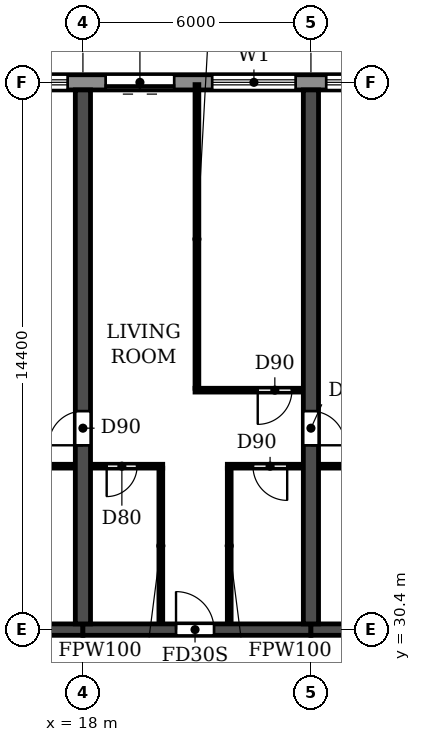
"""IFC4 building model, lengths in metres.
Left out: names, types, materials, properties, quantities, classifications, styles, units other than length and angle.
Written with IfcOpenShell. Run it as: python <this file> out.ifc"""

import sys

from ifc_helpers import new_model, si_unit, direction, frame, frame_2d, origin, place, context, subcontext, project, spatial, rectangle, extrude, element, fill, save


model = new_model("IFC4")
c1 = context("Model", 3, precision=1e-05, world=origin(), true_north=direction((0.0, 1.0)))
c2 = subcontext(c1, "Body", "Model", "MODEL_VIEW")
j1 = project(units=[si_unit("LENGTHUNIT", "METRE"), si_unit("PLANEANGLEUNIT", "RADIAN")], contexts=[c1])
p1 = place(None, origin())
s1 = spatial("IfcSite", under=j1, at=p1, CompositionType="ELEMENT")
p2 = place(p1, origin())
s2 = spatial("IfcBuilding", under=s1, at=p2, CompositionType="ELEMENT")
p3 = place(p2, frame((0.0, 0.0, 23.4)))
s3 = spatial("IfcBuildingStorey", under=s2, at=p3, CompositionType="ELEMENT", Elevation=23.4)
p4 = place(p3, frame((18.0, 30.55, 0.0), z_axis=(0.0, 0.0, 1.0), x_axis=(0.0, 1.0, 0.0)))
e1 = element("IfcWall", 1, at=p4, inside=s3, PredefinedType="SHEAR", context=c2, shape_type="SweptSolid", body=[
    extrude(rectangle(XDim=14.05, YDim=0.4, at=frame_2d((7.025, 0.0))), origin(), (0.0, 0.0, 1.0), 3.05),
])
p5 = place(p4, frame((4.7, 0.0, 0.0)))
e2 = element("IfcOpeningElement", 2, at=p5, cuts=e1, PredefinedType="OPENING", context=c2, shape_type="SweptSolid", body=[
    extrude(rectangle(XDim=0.9, YDim=2.1, at=frame_2d((0.45, 1.05))), frame((0.0, 0.21, 0.0), z_axis=(0.0, -1.0, 0.0), x_axis=(1.0, 0.0, 0.0)), (0.0, 0.0, 1.0), 0.42),
])
p6 = place(p3, frame((24.0, 30.55, 0.0), z_axis=(0.0, 0.0, 1.0), x_axis=(0.0, 1.0, 0.0)))
e3 = element("IfcWall", 3, at=p6, inside=s3, PredefinedType="SHEAR", context=c2, shape_type="SweptSolid", body=[
    extrude(rectangle(XDim=14.05, YDim=0.4, at=frame_2d((7.025, 0.0))), origin(), (0.0, 0.0, 1.0), 3.05),
])
p7 = place(p6, frame((4.7, 0.0, 0.0)))
e4 = element("IfcOpeningElement", 4, at=p7, cuts=e3, PredefinedType="OPENING", context=c2, shape_type="SweptSolid", body=[
    extrude(rectangle(XDim=0.9, YDim=2.1, at=frame_2d((0.45, 1.05))), frame((0.0, 0.21, 0.0), z_axis=(0.0, -1.0, 0.0), x_axis=(1.0, 0.0, 0.0)), (0.0, 0.0, 1.0), 0.42),
])
p8 = place(p3, frame((12.0, 30.4, 0.0), z_axis=(0.0, 0.0, 1.0), x_axis=(1.0, 0.0, 0.0)))
e5 = element("IfcWall", 5, at=p8, inside=s3, PredefinedType="SHEAR", context=c2, shape_type="SweptSolid", body=[
    extrude(rectangle(XDim=6.0, YDim=0.3, at=frame_2d((3.0, 0.0))), origin(), (0.0, 0.0, 1.0), 2.45),
])
p9 = place(p3, frame((18.0, 30.4, 0.0), z_axis=(0.0, 0.0, 1.0), x_axis=(1.0, 0.0, 0.0)))
e6 = element("IfcWall", 6, at=p9, inside=s3, PredefinedType="SHEAR", context=c2, shape_type="SweptSolid", body=[
    extrude(rectangle(XDim=6.0, YDim=0.3, at=frame_2d((3.0, 0.0))), origin(), (0.0, 0.0, 1.0), 2.45),
])
p10 = place(p9, frame((2.45, 0.0, 0.0)))
e7 = element("IfcOpeningElement", 7, at=p10, cuts=e6, PredefinedType="OPENING", context=c2, shape_type="SweptSolid", body=[
    extrude(rectangle(XDim=1.0, YDim=2.1, at=frame_2d((0.5, 1.05))), frame((0.0, 0.16, 0.0), z_axis=(0.0, -1.0, 0.0), x_axis=(1.0, 0.0, 0.0)), (0.0, 0.0, 1.0), 0.32),
])
p11 = place(p3, frame((24.0, 30.4, 0.0), z_axis=(0.0, 0.0, 1.0), x_axis=(1.0, 0.0, 0.0)))
e8 = element("IfcWall", 8, at=p11, inside=s3, PredefinedType="SHEAR", context=c2, shape_type="SweptSolid", body=[
    extrude(rectangle(XDim=6.0, YDim=0.3, at=frame_2d((3.0, 0.0))), origin(), (0.0, 0.0, 1.0), 2.45),
])
p12 = place(p3, frame((97.317, 44.8, 0.0), z_axis=(0.0, 0.0, 1.0), x_axis=(-1.0, 0.0, 0.0)))
e9 = element("IfcWall", 9, at=p12, inside=s3, PredefinedType="STANDARD", context=c2, shape_type="SweptSolid", body=[
    extrude(rectangle(XDim=92.634, YDim=0.4, at=frame_2d((46.317, 0.0))), origin(), (0.0, 0.0, 1.0), 3.05),
])
p13 = place(p12, frame((88.717, 0.0, 0.9)))
e10 = element("IfcOpeningElement", 10, at=p13, cuts=e9, PredefinedType="OPENING", context=c2, shape_type="SweptSolid", body=[
    extrude(rectangle(XDim=2.2, YDim=1.5, at=frame_2d((1.1, 0.75))), frame((0.0, 0.21, 0.0), z_axis=(0.0, -1.0, 0.0), x_axis=(1.0, 0.0, 0.0)), (0.0, 0.0, 1.0), 0.42),
])
p14 = place(p12, frame((85.917, 0.0, 0.0)))
e11 = element("IfcOpeningElement", 11, at=p14, cuts=e9, PredefinedType="OPENING", context=c2, shape_type="SweptSolid", body=[
    extrude(rectangle(XDim=1.8, YDim=2.4, at=frame_2d((0.9, 1.2))), frame((0.0, 0.21, 0.0), z_axis=(0.0, -1.0, 0.0), x_axis=(1.0, 0.0, 0.0)), (0.0, 0.0, 1.0), 0.42),
])
p15 = place(p12, frame((82.717, 0.0, 0.9)))
e12 = element("IfcOpeningElement", 12, at=p15, cuts=e9, PredefinedType="OPENING", context=c2, shape_type="SweptSolid", body=[
    extrude(rectangle(XDim=2.2, YDim=1.5, at=frame_2d((1.1, 0.75))), frame((0.0, 0.21, 0.0), z_axis=(0.0, -1.0, 0.0), x_axis=(1.0, 0.0, 0.0)), (0.0, 0.0, 1.0), 0.42),
])
p16 = place(p12, frame((79.717, 0.0, 0.9)))
e13 = element("IfcOpeningElement", 13, at=p16, cuts=e9, PredefinedType="OPENING", context=c2, shape_type="SweptSolid", body=[
    extrude(rectangle(XDim=2.2, YDim=1.5, at=frame_2d((1.1, 0.75))), frame((0.0, 0.21, 0.0), z_axis=(0.0, -1.0, 0.0), x_axis=(1.0, 0.0, 0.0)), (0.0, 0.0, 1.0), 0.42),
])
p17 = place(p12, frame((76.917, 0.0, 0.0)))
e14 = element("IfcOpeningElement", 14, at=p17, cuts=e9, PredefinedType="OPENING", context=c2, shape_type="SweptSolid", body=[
    extrude(rectangle(XDim=1.8, YDim=2.4, at=frame_2d((0.9, 1.2))), frame((0.0, 0.21, 0.0), z_axis=(0.0, -1.0, 0.0), x_axis=(1.0, 0.0, 0.0)), (0.0, 0.0, 1.0), 0.42),
])
p18 = place(p12, frame((73.717, 0.0, 0.9)))
e15 = element("IfcOpeningElement", 15, at=p18, cuts=e9, PredefinedType="OPENING", context=c2, shape_type="SweptSolid", body=[
    extrude(rectangle(XDim=2.2, YDim=1.5, at=frame_2d((1.1, 0.75))), frame((0.0, 0.21, 0.0), z_axis=(0.0, -1.0, 0.0), x_axis=(1.0, 0.0, 0.0)), (0.0, 0.0, 1.0), 0.42),
])
p19 = place(p12, frame((70.717, 0.0, 0.9)))
e16 = element("IfcOpeningElement", 16, at=p19, cuts=e9, PredefinedType="OPENING", context=c2, shape_type="SweptSolid", body=[
    extrude(rectangle(XDim=2.2, YDim=1.5, at=frame_2d((1.1, 0.75))), frame((0.0, 0.21, 0.0), z_axis=(0.0, -1.0, 0.0), x_axis=(1.0, 0.0, 0.0)), (0.0, 0.0, 1.0), 0.42),
])
p20 = place(p12, frame((67.717, 0.0, 0.9)))
e17 = element("IfcOpeningElement", 17, at=p20, cuts=e9, PredefinedType="OPENING", context=c2, shape_type="SweptSolid", body=[
    extrude(rectangle(XDim=2.2, YDim=1.5, at=frame_2d((1.1, 0.75))), frame((0.0, 0.21, 0.0), z_axis=(0.0, -1.0, 0.0), x_axis=(1.0, 0.0, 0.0)), (0.0, 0.0, 1.0), 0.42),
])
p21 = place(p12, frame((64.917, 0.0, 0.0)))
e18 = element("IfcOpeningElement", 18, at=p21, cuts=e9, PredefinedType="OPENING", context=c2, shape_type="SweptSolid", body=[
    extrude(rectangle(XDim=1.8, YDim=2.4, at=frame_2d((0.9, 1.2))), frame((0.0, 0.21, 0.0), z_axis=(0.0, -1.0, 0.0), x_axis=(1.0, 0.0, 0.0)), (0.0, 0.0, 1.0), 0.42),
])
p22 = place(p12, frame((61.717, 0.0, 0.9)))
e19 = element("IfcOpeningElement", 19, at=p22, cuts=e9, PredefinedType="OPENING", context=c2, shape_type="SweptSolid", body=[
    extrude(rectangle(XDim=2.2, YDim=1.5, at=frame_2d((1.1, 0.75))), frame((0.0, 0.21, 0.0), z_axis=(0.0, -1.0, 0.0), x_axis=(1.0, 0.0, 0.0)), (0.0, 0.0, 1.0), 0.42),
])
p23 = place(p12, frame((58.717, 0.0, 0.9)))
e20 = element("IfcOpeningElement", 20, at=p23, cuts=e9, PredefinedType="OPENING", context=c2, shape_type="SweptSolid", body=[
    extrude(rectangle(XDim=2.2, YDim=1.5, at=frame_2d((1.1, 0.75))), frame((0.0, 0.21, 0.0), z_axis=(0.0, -1.0, 0.0), x_axis=(1.0, 0.0, 0.0)), (0.0, 0.0, 1.0), 0.42),
])
p24 = place(p12, frame((55.917, 0.0, 0.0)))
e21 = element("IfcOpeningElement", 21, at=p24, cuts=e9, PredefinedType="OPENING", context=c2, shape_type="SweptSolid", body=[
    extrude(rectangle(XDim=1.8, YDim=2.4, at=frame_2d((0.9, 1.2))), frame((0.0, 0.21, 0.0), z_axis=(0.0, -1.0, 0.0), x_axis=(1.0, 0.0, 0.0)), (0.0, 0.0, 1.0), 0.42),
])
p25 = place(p12, frame((52.917, 0.0, 0.0)))
e22 = element("IfcOpeningElement", 22, at=p25, cuts=e9, PredefinedType="OPENING", context=c2, shape_type="SweptSolid", body=[
    extrude(rectangle(XDim=1.8, YDim=2.4, at=frame_2d((0.9, 1.2))), frame((0.0, 0.21, 0.0), z_axis=(0.0, -1.0, 0.0), x_axis=(1.0, 0.0, 0.0)), (0.0, 0.0, 1.0), 0.42),
])
p26 = place(p12, frame((49.717, 0.0, 0.9)))
e23 = element("IfcOpeningElement", 23, at=p26, cuts=e9, PredefinedType="OPENING", context=c2, shape_type="SweptSolid", body=[
    extrude(rectangle(XDim=2.2, YDim=1.5, at=frame_2d((1.1, 0.75))), frame((0.0, 0.21, 0.0), z_axis=(0.0, -1.0, 0.0), x_axis=(1.0, 0.0, 0.0)), (0.0, 0.0, 1.0), 0.42),
])
p27 = place(p12, frame((46.917, 0.0, 0.0)))
e24 = element("IfcOpeningElement", 24, at=p27, cuts=e9, PredefinedType="OPENING", context=c2, shape_type="SweptSolid", body=[
    extrude(rectangle(XDim=1.8, YDim=2.4, at=frame_2d((0.9, 1.2))), frame((0.0, 0.21, 0.0), z_axis=(0.0, -1.0, 0.0), x_axis=(1.0, 0.0, 0.0)), (0.0, 0.0, 1.0), 0.42),
])
p28 = place(p12, frame((43.717, 0.0, 0.9)))
e25 = element("IfcOpeningElement", 25, at=p28, cuts=e9, PredefinedType="OPENING", context=c2, shape_type="SweptSolid", body=[
    extrude(rectangle(XDim=2.2, YDim=1.5, at=frame_2d((1.1, 0.75))), frame((0.0, 0.21, 0.0), z_axis=(0.0, -1.0, 0.0), x_axis=(1.0, 0.0, 0.0)), (0.0, 0.0, 1.0), 0.42),
])
p29 = place(p12, frame((40.717, 0.0, 0.9)))
e26 = element("IfcOpeningElement", 26, at=p29, cuts=e9, PredefinedType="OPENING", context=c2, shape_type="SweptSolid", body=[
    extrude(rectangle(XDim=2.2, YDim=1.5, at=frame_2d((1.1, 0.75))), frame((0.0, 0.21, 0.0), z_axis=(0.0, -1.0, 0.0), x_axis=(1.0, 0.0, 0.0)), (0.0, 0.0, 1.0), 0.42),
])
p30 = place(p12, frame((37.917, 0.0, 0.0)))
e27 = element("IfcOpeningElement", 27, at=p30, cuts=e9, PredefinedType="OPENING", context=c2, shape_type="SweptSolid", body=[
    extrude(rectangle(XDim=1.8, YDim=2.4, at=frame_2d((0.9, 1.2))), frame((0.0, 0.21, 0.0), z_axis=(0.0, -1.0, 0.0), x_axis=(1.0, 0.0, 0.0)), (0.0, 0.0, 1.0), 0.42),
])
p31 = place(p12, frame((34.917, 0.0, 0.0)))
e28 = element("IfcOpeningElement", 28, at=p31, cuts=e9, PredefinedType="OPENING", context=c2, shape_type="SweptSolid", body=[
    extrude(rectangle(XDim=1.8, YDim=2.4, at=frame_2d((0.9, 1.2))), frame((0.0, 0.21, 0.0), z_axis=(0.0, -1.0, 0.0), x_axis=(1.0, 0.0, 0.0)), (0.0, 0.0, 1.0), 0.42),
])
p32 = place(p12, frame((31.717, 0.0, 0.9)))
e29 = element("IfcOpeningElement", 29, at=p32, cuts=e9, PredefinedType="OPENING", context=c2, shape_type="SweptSolid", body=[
    extrude(rectangle(XDim=2.2, YDim=1.5, at=frame_2d((1.1, 0.75))), frame((0.0, 0.21, 0.0), z_axis=(0.0, -1.0, 0.0), x_axis=(1.0, 0.0, 0.0)), (0.0, 0.0, 1.0), 0.42),
])
p33 = place(p12, frame((28.717, 0.0, 0.9)))
e30 = element("IfcOpeningElement", 30, at=p33, cuts=e9, PredefinedType="OPENING", context=c2, shape_type="SweptSolid", body=[
    extrude(rectangle(XDim=2.2, YDim=1.5, at=frame_2d((1.1, 0.75))), frame((0.0, 0.21, 0.0), z_axis=(0.0, -1.0, 0.0), x_axis=(1.0, 0.0, 0.0)), (0.0, 0.0, 1.0), 0.42),
])
p34 = place(p12, frame((25.717, 0.0, 0.9)))
e31 = element("IfcOpeningElement", 31, at=p34, cuts=e9, PredefinedType="OPENING", context=c2, shape_type="SweptSolid", body=[
    extrude(rectangle(XDim=2.2, YDim=1.5, at=frame_2d((1.1, 0.75))), frame((0.0, 0.21, 0.0), z_axis=(0.0, -1.0, 0.0), x_axis=(1.0, 0.0, 0.0)), (0.0, 0.0, 1.0), 0.42),
])
p35 = place(p12, frame((22.717, 0.0, 0.9)))
e32 = element("IfcOpeningElement", 32, at=p35, cuts=e9, PredefinedType="OPENING", context=c2, shape_type="SweptSolid", body=[
    extrude(rectangle(XDim=2.2, YDim=1.5, at=frame_2d((1.1, 0.75))), frame((0.0, 0.21, 0.0), z_axis=(0.0, -1.0, 0.0), x_axis=(1.0, 0.0, 0.0)), (0.0, 0.0, 1.0), 0.42),
])
p36 = place(p12, frame((19.917, 0.0, 0.0)))
e33 = element("IfcOpeningElement", 33, at=p36, cuts=e9, PredefinedType="OPENING", context=c2, shape_type="SweptSolid", body=[
    extrude(rectangle(XDim=1.8, YDim=2.4, at=frame_2d((0.9, 1.2))), frame((0.0, 0.21, 0.0), z_axis=(0.0, -1.0, 0.0), x_axis=(1.0, 0.0, 0.0)), (0.0, 0.0, 1.0), 0.42),
])
p37 = place(p12, frame((16.717, 0.0, 0.9)))
e34 = element("IfcOpeningElement", 34, at=p37, cuts=e9, PredefinedType="OPENING", context=c2, shape_type="SweptSolid", body=[
    extrude(rectangle(XDim=2.2, YDim=1.5, at=frame_2d((1.1, 0.75))), frame((0.0, 0.21, 0.0), z_axis=(0.0, -1.0, 0.0), x_axis=(1.0, 0.0, 0.0)), (0.0, 0.0, 1.0), 0.42),
])
p38 = place(p12, frame((13.717, 0.0, 0.9)))
e35 = element("IfcOpeningElement", 35, at=p38, cuts=e9, PredefinedType="OPENING", context=c2, shape_type="SweptSolid", body=[
    extrude(rectangle(XDim=2.2, YDim=1.5, at=frame_2d((1.1, 0.75))), frame((0.0, 0.21, 0.0), z_axis=(0.0, -1.0, 0.0), x_axis=(1.0, 0.0, 0.0)), (0.0, 0.0, 1.0), 0.42),
])
p39 = place(p12, frame((10.717, 0.0, 0.9)))
e36 = element("IfcOpeningElement", 36, at=p39, cuts=e9, PredefinedType="OPENING", context=c2, shape_type="SweptSolid", body=[
    extrude(rectangle(XDim=2.2, YDim=1.5, at=frame_2d((1.1, 0.75))), frame((0.0, 0.21, 0.0), z_axis=(0.0, -1.0, 0.0), x_axis=(1.0, 0.0, 0.0)), (0.0, 0.0, 1.0), 0.42),
])
p40 = place(p12, frame((7.917, 0.0, 0.0)))
e37 = element("IfcOpeningElement", 37, at=p40, cuts=e9, PredefinedType="OPENING", context=c2, shape_type="SweptSolid", body=[
    extrude(rectangle(XDim=1.8, YDim=2.4, at=frame_2d((0.9, 1.2))), frame((0.0, 0.21, 0.0), z_axis=(0.0, -1.0, 0.0), x_axis=(1.0, 0.0, 0.0)), (0.0, 0.0, 1.0), 0.42),
])
p41 = place(p12, frame((4.917, 0.0, 0.0)))
e38 = element("IfcOpeningElement", 38, at=p41, cuts=e9, PredefinedType="OPENING", context=c2, shape_type="SweptSolid", body=[
    extrude(rectangle(XDim=1.8, YDim=2.4, at=frame_2d((0.9, 1.2))), frame((0.0, 0.21, 0.0), z_axis=(0.0, -1.0, 0.0), x_axis=(1.0, 0.0, 0.0)), (0.0, 0.0, 1.0), 0.42),
])
p42 = place(p12, frame((1.717, 0.0, 0.9)))
e39 = element("IfcOpeningElement", 39, at=p42, cuts=e9, PredefinedType="OPENING", context=c2, shape_type="SweptSolid", body=[
    extrude(rectangle(XDim=2.2, YDim=1.5, at=frame_2d((1.1, 0.75))), frame((0.0, 0.21, 0.0), z_axis=(0.0, -1.0, 0.0), x_axis=(1.0, 0.0, 0.0)), (0.0, 0.0, 1.0), 0.42),
])
p43 = place(p3, frame((15.1, 34.7, 0.0), z_axis=(0.0, 0.0, 1.0), x_axis=(1.0, 0.0, 0.0)))
e40 = element("IfcWall", 40, at=p43, inside=s3, PredefinedType="PARTITIONING", context=c2, shape_type="SweptSolid", body=[
    extrude(rectangle(XDim=2.69, YDim=0.1, at=frame_2d((1.345, 0.0))), origin(), (0.0, 0.0, 1.0), 3.05),
])
p44 = place(p43, frame((1.0, 0.0, 0.0)))
e41 = element("IfcOpeningElement", 41, at=p44, cuts=e40, PredefinedType="OPENING", context=c2, shape_type="SweptSolid", body=[
    extrude(rectangle(XDim=0.8, YDim=2.1, at=frame_2d((0.4, 1.05))), frame((0.0, 0.06, 0.0), z_axis=(0.0, -1.0, 0.0), x_axis=(1.0, 0.0, 0.0)), (0.0, 0.0, 1.0), 0.12),
])
p45 = place(p3, frame((18.21, 34.7, 0.0), z_axis=(0.0, 0.0, 1.0), x_axis=(1.0, 0.0, 0.0)))
e42 = element("IfcWall", 42, at=p45, inside=s3, PredefinedType="PARTITIONING", context=c2, shape_type="SweptSolid", body=[
    extrude(rectangle(XDim=1.89, YDim=0.1, at=frame_2d((0.945, 0.0))), origin(), (0.0, 0.0, 1.0), 3.05),
])
p46 = place(p45, frame((0.415, 0.0, 0.0)))
e43 = element("IfcOpeningElement", 43, at=p46, cuts=e42, PredefinedType="OPENING", context=c2, shape_type="SweptSolid", body=[
    extrude(rectangle(XDim=0.8, YDim=2.1, at=frame_2d((0.4, 1.05))), frame((0.0, 0.06, 0.0), z_axis=(0.0, -1.0, 0.0), x_axis=(1.0, 0.0, 0.0)), (0.0, 0.0, 1.0), 0.12),
])
p47 = place(p3, frame((21.8, 34.7, 0.0), z_axis=(0.0, 0.0, 1.0), x_axis=(1.0, 0.0, 0.0)))
e44 = element("IfcWall", 44, at=p47, inside=s3, PredefinedType="PARTITIONING", context=c2, shape_type="SweptSolid", body=[
    extrude(rectangle(XDim=1.99, YDim=0.1, at=frame_2d((0.995, 0.0))), origin(), (0.0, 0.0, 1.0), 3.05),
])
p48 = place(p47, frame((0.675, 0.0, 0.0)))
e45 = element("IfcOpeningElement", 45, at=p48, cuts=e44, PredefinedType="OPENING", context=c2, shape_type="SweptSolid", body=[
    extrude(rectangle(XDim=0.9, YDim=2.1, at=frame_2d((0.45, 1.05))), frame((0.0, 0.06, 0.0), z_axis=(0.0, -1.0, 0.0), x_axis=(1.0, 0.0, 0.0)), (0.0, 0.0, 1.0), 0.12),
])
p49 = place(p3, frame((24.21, 34.7, 0.0), z_axis=(0.0, 0.0, 1.0), x_axis=(1.0, 0.0, 0.0)))
e46 = element("IfcWall", 46, at=p49, inside=s3, PredefinedType="PARTITIONING", context=c2, shape_type="SweptSolid", body=[
    extrude(rectangle(XDim=2.69, YDim=0.1, at=frame_2d((1.345, 0.0))), origin(), (0.0, 0.0, 1.0), 3.05),
])
p50 = place(p49, frame((0.89, 0.0, 0.0)))
e47 = element("IfcOpeningElement", 47, at=p50, cuts=e46, PredefinedType="OPENING", context=c2, shape_type="SweptSolid", body=[
    extrude(rectangle(XDim=0.8, YDim=2.1, at=frame_2d((0.4, 1.05))), frame((0.0, 0.06, 0.0), z_axis=(0.0, -1.0, 0.0), x_axis=(1.0, 0.0, 0.0)), (0.0, 0.0, 1.0), 0.12),
])
p51 = place(p3, frame((20.95, 36.7, 0.0), z_axis=(0.0, 0.0, 1.0), x_axis=(1.0, 0.0, 0.0)))
e48 = element("IfcWall", 48, at=p51, inside=s3, PredefinedType="PARTITIONING", context=c2, shape_type="SweptSolid", body=[
    extrude(rectangle(XDim=2.84, YDim=0.1, at=frame_2d((1.42, 0.0))), origin(), (0.0, 0.0, 1.0), 3.05),
])
p52 = place(p51, frame((1.65, 0.0, 0.0)))
e49 = element("IfcOpeningElement", 49, at=p52, cuts=e48, PredefinedType="OPENING", context=c2, shape_type="SweptSolid", body=[
    extrude(rectangle(XDim=0.9, YDim=2.1, at=frame_2d((0.45, 1.05))), frame((0.0, 0.06, 0.0), z_axis=(0.0, -1.0, 0.0), x_axis=(1.0, 0.0, 0.0)), (0.0, 0.0, 1.0), 0.12),
])
p53 = place(p3, frame((20.05, 30.56, 0.0), z_axis=(0.0, 0.0, 1.0), x_axis=(0.0, 1.0, 0.0)))
e50 = element("IfcWall", 50, at=p53, inside=s3, PredefinedType="PARTITIONING", context=c2, shape_type="SweptSolid", body=[
    extrude(rectangle(XDim=4.09, YDim=0.1, at=frame_2d((2.045, 0.0))), origin(), (0.0, 0.0, 1.0), 3.05),
])
p54 = place(p3, frame((21.0, 36.75, 0.0), z_axis=(0.0, 0.0, 1.0), x_axis=(0.0, 1.0, 0.0)))
e51 = element("IfcWall", 51, at=p54, inside=s3, PredefinedType="PARTITIONING", context=c2, shape_type="SweptSolid", body=[
    extrude(rectangle(XDim=7.99, YDim=0.1, at=frame_2d((3.995, 0.0))), origin(), (0.0, 0.0, 1.0), 3.05),
])
p55 = place(p3, frame((21.85, 30.56, 0.0), z_axis=(0.0, 0.0, 1.0), x_axis=(0.0, 1.0, 0.0)))
e52 = element("IfcWall", 52, at=p55, inside=s3, PredefinedType="PARTITIONING", context=c2, shape_type="SweptSolid", body=[
    extrude(rectangle(XDim=4.09, YDim=0.1, at=frame_2d((2.045, 0.0))), origin(), (0.0, 0.0, 1.0), 3.05),
])
p56 = place(p16, origin())
e53 = element("IfcWindow", 53, at=p56, inside=s3, PartitioningType="DOUBLE_PANEL_HORIZONTAL", PredefinedType="WINDOW", context=c2, shape_type="SweptSolid", body=[
    extrude(rectangle(XDim=2.2, YDim=1.5, at=frame_2d((1.1, 0.75))), frame((0.0, 0.03, 0.0), z_axis=(0.0, -1.0, 0.0), x_axis=(1.0, 0.0, 0.0)), (0.0, 0.0, 1.0), 0.06),
])
fill(e13, e53)
p57 = place(p17, origin())
e54 = element("IfcDoor", 54, at=p57, inside=s3, OperationType="DOUBLE_DOOR_SLIDING", PredefinedType="DOOR", context=c2, shape_type="SweptSolid", body=[
    extrude(rectangle(XDim=1.8, YDim=2.4, at=frame_2d((0.9, 1.2))), frame((0.0, 0.025, 0.0), z_axis=(0.0, -1.0, 0.0), x_axis=(1.0, 0.0, 0.0)), (0.0, 0.0, 1.0), 0.05),
])
fill(e14, e54)
p58 = place(p18, origin())
e55 = element("IfcWindow", 55, at=p58, inside=s3, PartitioningType="DOUBLE_PANEL_HORIZONTAL", PredefinedType="WINDOW", context=c2, shape_type="SweptSolid", body=[
    extrude(rectangle(XDim=2.2, YDim=1.5, at=frame_2d((1.1, 0.75))), frame((0.0, 0.03, 0.0), z_axis=(0.0, -1.0, 0.0), x_axis=(1.0, 0.0, 0.0)), (0.0, 0.0, 1.0), 0.06),
])
fill(e15, e55)
p59 = place(p19, origin())
e56 = element("IfcWindow", 56, at=p59, inside=s3, PartitioningType="DOUBLE_PANEL_HORIZONTAL", PredefinedType="WINDOW", context=c2, shape_type="SweptSolid", body=[
    extrude(rectangle(XDim=2.2, YDim=1.5, at=frame_2d((1.1, 0.75))), frame((0.0, 0.03, 0.0), z_axis=(0.0, -1.0, 0.0), x_axis=(1.0, 0.0, 0.0)), (0.0, 0.0, 1.0), 0.06),
])
fill(e16, e56)
p60 = place(p5, origin())
e57 = element("IfcDoor", 57, at=p60, inside=s3, OperationType="SINGLE_SWING_LEFT", PredefinedType="DOOR", context=c2, shape_type="SweptSolid", body=[
    extrude(rectangle(XDim=0.9, YDim=2.1, at=frame_2d((0.45, 1.05))), frame((0.0, 0.025, 0.0), z_axis=(0.0, -1.0, 0.0), x_axis=(1.0, 0.0, 0.0)), (0.0, 0.0, 1.0), 0.05),
])
fill(e2, e57)
p61 = place(p46, frame((0.8, 0.0, 0.0), z_axis=(0.0, 0.0, 1.0), x_axis=(-1.0, 0.0, 0.0)))
e58 = element("IfcDoor", 58, at=p61, inside=s3, OperationType="SINGLE_SWING_RIGHT", PredefinedType="DOOR", context=c2, shape_type="SweptSolid", body=[
    extrude(rectangle(XDim=0.8, YDim=2.1, at=frame_2d((0.4, 1.05))), frame((0.0, 0.025, 0.0), z_axis=(0.0, -1.0, 0.0), x_axis=(1.0, 0.0, 0.0)), (0.0, 0.0, 1.0), 0.05),
])
fill(e43, e58)
p62 = place(p10, origin())
e59 = element("IfcDoor", 59, at=p62, inside=s3, OperationType="SINGLE_SWING_LEFT", PredefinedType="DOOR", context=c2, shape_type="SweptSolid", body=[
    extrude(rectangle(XDim=1.0, YDim=2.1, at=frame_2d((0.5, 1.05))), frame((0.0, 0.025, 0.0), z_axis=(0.0, -1.0, 0.0), x_axis=(1.0, 0.0, 0.0)), (0.0, 0.0, 1.0), 0.05),
])
fill(e7, e59)
p63 = place(p48, frame((0.9, 0.0, 0.0), z_axis=(0.0, 0.0, 1.0), x_axis=(-1.0, 0.0, 0.0)))
e60 = element("IfcDoor", 60, at=p63, inside=s3, OperationType="SINGLE_SWING_LEFT", PredefinedType="DOOR", context=c2, shape_type="SweptSolid", body=[
    extrude(rectangle(XDim=0.9, YDim=2.1, at=frame_2d((0.45, 1.05))), frame((0.0, 0.025, 0.0), z_axis=(0.0, -1.0, 0.0), x_axis=(1.0, 0.0, 0.0)), (0.0, 0.0, 1.0), 0.05),
])
fill(e45, e60)
p64 = place(p52, frame((0.9, 0.0, 0.0), z_axis=(0.0, 0.0, 1.0), x_axis=(-1.0, 0.0, 0.0)))
e61 = element("IfcDoor", 61, at=p64, inside=s3, OperationType="SINGLE_SWING_RIGHT", PredefinedType="DOOR", context=c2, shape_type="SweptSolid", body=[
    extrude(rectangle(XDim=0.9, YDim=2.1, at=frame_2d((0.45, 1.05))), frame((0.0, 0.025, 0.0), z_axis=(0.0, -1.0, 0.0), x_axis=(1.0, 0.0, 0.0)), (0.0, 0.0, 1.0), 0.05),
])
fill(e49, e61)
p65 = place(p7, frame((0.9, 0.0, 0.0), z_axis=(0.0, 0.0, 1.0), x_axis=(-1.0, 0.0, 0.0)))
e62 = element("IfcDoor", 62, at=p65, inside=s3, OperationType="SINGLE_SWING_RIGHT", PredefinedType="DOOR", context=c2, shape_type="SweptSolid", body=[
    extrude(rectangle(XDim=0.9, YDim=2.1, at=frame_2d((0.45, 1.05))), frame((0.0, 0.025, 0.0), z_axis=(0.0, -1.0, 0.0), x_axis=(1.0, 0.0, 0.0)), (0.0, 0.0, 1.0), 0.05),
])
fill(e4, e62)
save(model, sys.argv[1])
